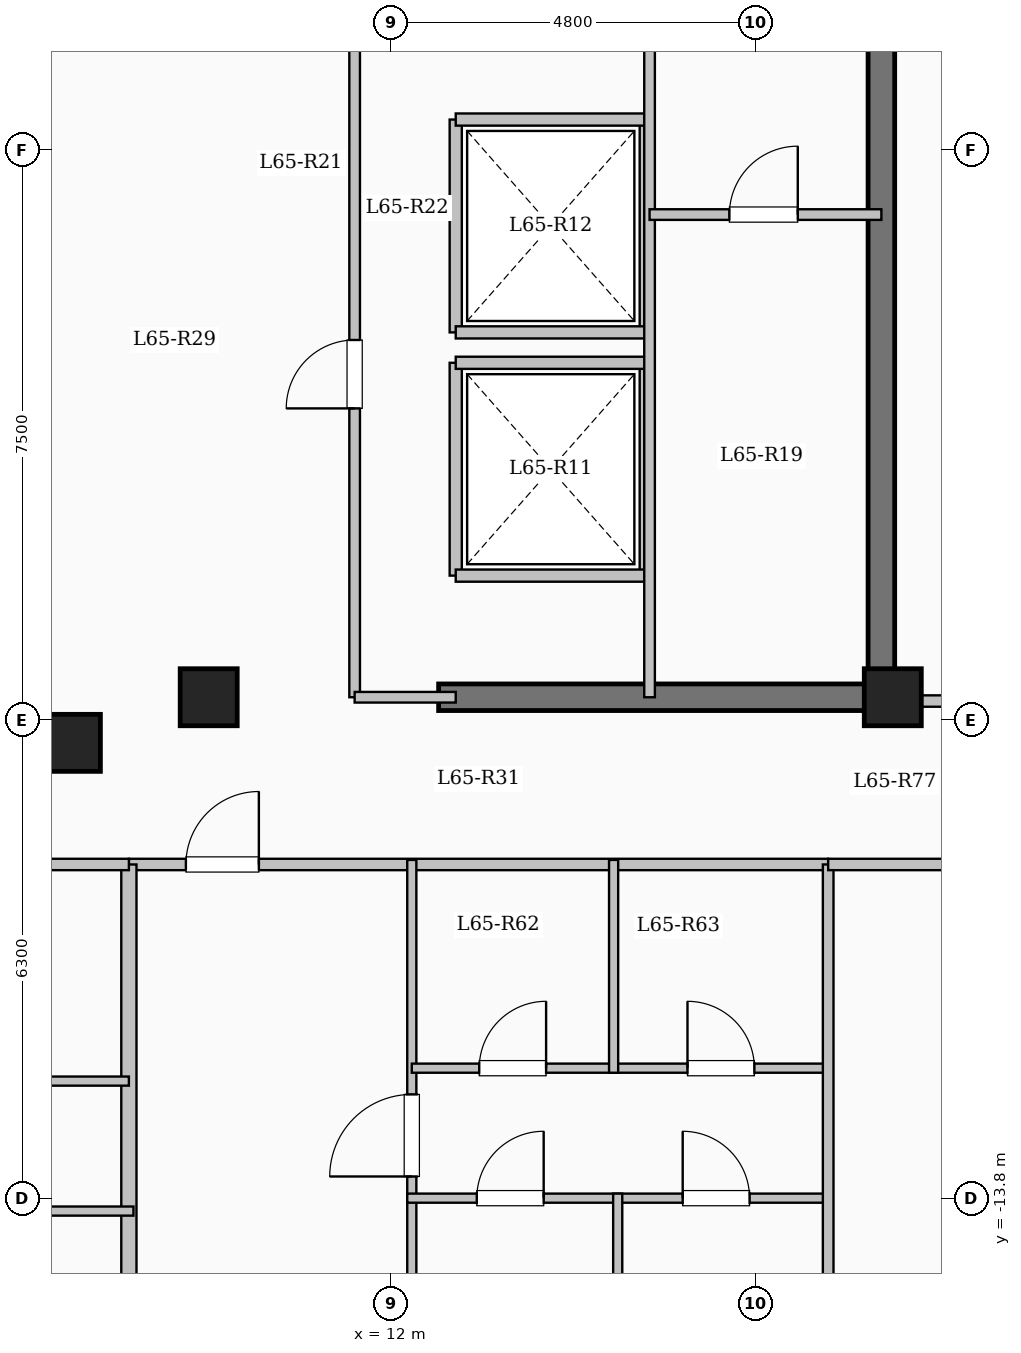
"""IFC4 building model, lengths in metres.
Left out: names, types, materials, properties, quantities, classifications, styles, units other than length and angle.
Written with IfcOpenShell. Run it as: python <this file> out.ifc"""

import sys

from ifc_helpers import new_model, si_unit, direction, frame, frame_2d, origin, origin_2d, place, context, subcontext, project, spatial, rectangle, extrude, element, fill, save


model = new_model("IFC4")
c1 = context("Model", 3, precision=1e-05, world=origin(), true_north=direction((0.0, 1.0)))
c2 = subcontext(c1, "Body", "Model", "MODEL_VIEW")
j1 = project(units=[si_unit("LENGTHUNIT", "METRE"), si_unit("PLANEANGLEUNIT", "RADIAN")], contexts=[c1])
p1 = place(None, origin())
s1 = spatial("IfcSite", under=j1, at=p1, CompositionType="ELEMENT")
p2 = place(p1, origin())
s2 = spatial("IfcBuilding", under=s1, at=p2, CompositionType="ELEMENT")
p3 = place(p2, frame((0.0, 0.0, 241.5)))
s3 = spatial("IfcBuildingStorey", under=s2, at=p3, CompositionType="ELEMENT", Elevation=241.5)
for number, where, z_axis, x_axis in (
    (1, (7.8, -7.8, 0.0), (0.0, 0.0, 1.0), (1.0, 0.0, 0.0)),
    (2, (9.6, -7.2, 0.0), (0.0, 0.0, 1.0), (1.0, 0.0, 0.0)),
    (3, (18.6, -7.2, 0.0), (0.0, 0.0, 1.0), (1.0, 0.0, 0.0)),
):
    element("IfcColumn", number, at=place(p3, frame(where, z_axis=z_axis, x_axis=x_axis)), inside=s3, PredefinedType="COLUMN", context=c2, shape_type="SweptSolid", body=[
        extrude(rectangle(XDim=0.75, YDim=0.75, at=origin_2d()), origin(), (0.0, 0.0, 1.0), 3.35),
    ])
for number, where, z_axis, x_axis in (
    (4, (12.85, -5.6, 0.0), (0.0, 0.0, 1.0), (0.0, 1.0, 0.0)),
    (5, (15.35, -5.6, 0.0), (0.0, 0.0, 1.0), (0.0, 1.0, 0.0)),
):
    element("IfcWall", number, at=place(p3, frame(where, z_axis=z_axis, x_axis=x_axis)), inside=s3, PredefinedType="SOLIDWALL", context=c2, shape_type="SweptSolid", body=[
        extrude(rectangle(XDim=2.8, YDim=0.16, at=frame_2d((1.4, 0.0))), origin(), (0.0, 0.0, 1.0), 3.1),
    ])
for number, where, z_axis, x_axis in (
    (6, (12.85, -5.6, 0.0), (0.0, 0.0, 1.0), (1.0, 0.0, 0.0)),
    (7, (12.85, -2.8, 0.0), (0.0, 0.0, 1.0), (1.0, 0.0, 0.0)),
):
    element("IfcWall", number, at=place(p3, frame(where, z_axis=z_axis, x_axis=x_axis)), inside=s3, PredefinedType="SOLIDWALL", context=c2, shape_type="SweptSolid", body=[
        extrude(rectangle(XDim=2.5, YDim=0.16, at=frame_2d((1.25, 0.0))), origin(), (0.0, 0.0, 1.0), 3.1),
    ])
for number, where, z_axis, x_axis in (
    (8, (12.85, -2.4, 0.0), (0.0, 0.0, 1.0), (0.0, 1.0, 0.0)),
    (9, (15.35, -2.4, 0.0), (0.0, 0.0, 1.0), (0.0, 1.0, 0.0)),
):
    element("IfcWall", number, at=place(p3, frame(where, z_axis=z_axis, x_axis=x_axis)), inside=s3, PredefinedType="SOLIDWALL", context=c2, shape_type="SweptSolid", body=[
        extrude(rectangle(XDim=2.8, YDim=0.16, at=frame_2d((1.4, 0.0))), origin(), (0.0, 0.0, 1.0), 3.1),
    ])
for number, where, z_axis, x_axis in (
    (10, (12.85, -2.4, 0.0), (0.0, 0.0, 1.0), (1.0, 0.0, 0.0)),
    (11, (12.85, 0.4, 0.0), (0.0, 0.0, 1.0), (1.0, 0.0, 0.0)),
):
    element("IfcWall", number, at=place(p3, frame(where, z_axis=z_axis, x_axis=x_axis)), inside=s3, PredefinedType="SOLIDWALL", context=c2, shape_type="SweptSolid", body=[
        extrude(rectangle(XDim=2.5, YDim=0.16, at=frame_2d((1.25, 0.0))), origin(), (0.0, 0.0, 1.0), 3.1),
    ])
p4 = place(p3, frame((18.45, -7.375, 0.0), z_axis=(0.0, 0.0, 1.0), x_axis=(0.0, 1.0, 0.0)))
e12 = element("IfcWall", 12, at=p4, inside=s3, PredefinedType="SHEAR", context=c2, shape_type="SweptSolid", body=[
    extrude(rectangle(XDim=14.05, YDim=0.35, at=frame_2d((7.025, 0.0))), origin(), (0.0, 0.0, 1.0), 3.35),
])
p5 = place(p3, frame((12.625, -7.2, 0.0), z_axis=(0.0, 0.0, 1.0), x_axis=(1.0, 0.0, 0.0)))
e13 = element("IfcWall", 13, at=p5, inside=s3, PredefinedType="SHEAR", context=c2, shape_type="SweptSolid", body=[
    extrude(rectangle(XDim=6.0, YDim=0.35, at=frame_2d((3.0, 0.0))), origin(), (0.0, 0.0, 1.0), 3.35),
])
p6 = place(p3, frame((15.4, -7.2, 0.0), z_axis=(0.0, 0.0, 1.0), x_axis=(0.0, 1.0, 0.0)))
e14 = element("IfcWall", 14, at=p6, inside=s3, PredefinedType="PARTITIONING", context=c2, shape_type="SweptSolid", body=[
    extrude(rectangle(XDim=10.45, YDim=0.14, at=frame_2d((5.225, 0.0))), origin(), (0.0, 0.0, 1.0), 3.1),
])
p7 = place(p6, frame((9.25, 0.0, 0.0)))
e15 = element("IfcOpeningElement", 15, at=p7, cuts=e14, PredefinedType="OPENING", context=c2, shape_type="SweptSolid", body=[
    extrude(rectangle(XDim=0.9, YDim=2.08, at=frame_2d((0.45, 1.04))), frame((0.0, 0.08, 0.0), z_axis=(0.0, -1.0, 0.0), x_axis=(1.0, 0.0, 0.0)), (0.0, 0.0, 1.0), 0.16),
])
p8 = place(p3, frame((15.4, -0.85, 0.0), z_axis=(0.0, 0.0, 1.0), x_axis=(1.0, 0.0, 0.0)))
e16 = element("IfcWall", 16, at=p8, inside=s3, PredefinedType="PARTITIONING", context=c2, shape_type="SweptSolid", body=[
    extrude(rectangle(XDim=3.05, YDim=0.14, at=frame_2d((1.525, 0.0))), origin(), (0.0, 0.0, 1.0), 3.1),
])
p9 = place(p8, frame((1.05, 0.0, 0.0)))
e17 = element("IfcOpeningElement", 17, at=p9, cuts=e16, PredefinedType="OPENING", context=c2, shape_type="SweptSolid", body=[
    extrude(rectangle(XDim=0.9, YDim=2.08, at=frame_2d((0.45, 1.04))), frame((0.0, 0.08, 0.0), z_axis=(0.0, -1.0, 0.0), x_axis=(1.0, 0.0, 0.0)), (0.0, 0.0, 1.0), 0.16),
])
p10 = place(p3, frame((11.52, -7.2, 0.0), z_axis=(0.0, 0.0, 1.0), x_axis=(0.0, 1.0, 0.0)))
e18 = element("IfcWall", 18, at=p10, inside=s3, PredefinedType="PARTITIONING", context=c2, shape_type="SweptSolid", body=[
    extrude(rectangle(XDim=9.12, YDim=0.14, at=frame_2d((4.56, 0.0))), origin(), (0.0, 0.0, 1.0), 3.1),
])
p11 = place(p10, frame((3.8, 0.0, 0.0)))
e19 = element("IfcOpeningElement", 19, at=p11, cuts=e18, PredefinedType="OPENING", context=c2, shape_type="SweptSolid", body=[
    extrude(rectangle(XDim=0.9, YDim=2.08, at=frame_2d((0.45, 1.04))), frame((0.0, 0.08, 0.0), z_axis=(0.0, -1.0, 0.0), x_axis=(1.0, 0.0, 0.0)), (0.0, 0.0, 1.0), 0.16),
])
p12 = place(p3, frame((11.52, -7.2, 0.0), z_axis=(0.0, 0.0, 1.0), x_axis=(1.0, 0.0, 0.0)))
e20 = element("IfcWall", 20, at=p12, inside=s3, PredefinedType="PARTITIONING", context=c2, shape_type="SweptSolid", body=[
    extrude(rectangle(XDim=1.33, YDim=0.14, at=frame_2d((0.665, 0.0))), origin(), (0.0, 0.0, 1.0), 2.235),
])
p13 = place(p3, frame((8.55, -9.4, 0.0), z_axis=(0.0, 0.0, 1.0), x_axis=(1.0, 0.0, 0.0)))
e21 = element("IfcWall", 21, at=p13, inside=s3, PredefinedType="PARTITIONING", context=c2, shape_type="SweptSolid", body=[
    extrude(rectangle(XDim=9.2, YDim=0.15, at=frame_2d((4.6, 0.0))), origin(), (0.0, 0.0, 1.0), 3.1),
])
p14 = place(p13, frame((0.75, 0.0, 0.0)))
e22 = element("IfcOpeningElement", 22, at=p14, cuts=e21, PredefinedType="OPENING", context=c2, shape_type="SweptSolid", body=[
    extrude(rectangle(XDim=0.96, YDim=2.15, at=frame_2d((0.48, 1.075))), frame((0.0, 0.085, 0.0), z_axis=(0.0, -1.0, 0.0), x_axis=(1.0, 0.0, 0.0)), (0.0, 0.0, 1.0), 0.17),
])
p15 = place(p3, frame((12.272, -20.9, 0.0), z_axis=(0.0, 0.0, 1.0), x_axis=(0.0, 1.0, 0.0)))
e23 = element("IfcWall", 23, at=p15, inside=s3, PredefinedType="PARTITIONING", context=c2, shape_type="SweptSolid", body=[
    extrude(rectangle(XDim=11.56, YDim=0.12, at=frame_2d((5.78, 0.0))), origin(), (0.0, 0.0, 1.0), 3.1),
])
p16 = place(p15, frame((7.395, 0.0, 0.0)))
e24 = element("IfcOpeningElement", 24, at=p16, cuts=e23, PredefinedType="OPENING", context=c2, shape_type="SweptSolid", body=[
    extrude(rectangle(XDim=1.08, YDim=2.15, at=frame_2d((0.54, 1.075))), frame((0.0, 0.07, 0.0), z_axis=(0.0, -1.0, 0.0), x_axis=(1.0, 0.0, 0.0)), (0.0, 0.0, 1.0), 0.14),
])
p17 = place(p3, frame((12.272, -12.08, 0.0), z_axis=(0.0, 0.0, 1.0), x_axis=(1.0, 0.0, 0.0)))
e25 = element("IfcWall", 25, at=p17, inside=s3, PredefinedType="PARTITIONING", context=c2, shape_type="SweptSolid", body=[
    extrude(rectangle(XDim=2.655, YDim=0.12, at=frame_2d((1.328, 0.0))), origin(), (0.0, 0.0, 1.0), 2.785),
])
p18 = place(p17, frame((0.887, 0.0, 0.0)))
e26 = element("IfcOpeningElement", 26, at=p18, cuts=e25, PredefinedType="OPENING", context=c2, shape_type="SweptSolid", body=[
    extrude(rectangle(XDim=0.88, YDim=2.1, at=frame_2d((0.44, 1.05))), frame((0.0, 0.07, 0.0), z_axis=(0.0, -1.0, 0.0), x_axis=(1.0, 0.0, 0.0)), (0.0, 0.0, 1.0), 0.14),
])
p19 = place(p3, frame((14.927, -12.08, 0.0), z_axis=(0.0, 0.0, 1.0), x_axis=(1.0, 0.0, 0.0)))
e27 = element("IfcWall", 27, at=p19, inside=s3, PredefinedType="PARTITIONING", context=c2, shape_type="SweptSolid", body=[
    extrude(rectangle(XDim=2.823, YDim=0.12, at=frame_2d((1.412, 0.0))), origin(), (0.0, 0.0, 1.0), 3.1),
])
p20 = place(p19, frame((0.972, 0.0, 0.0)))
e28 = element("IfcOpeningElement", 28, at=p20, cuts=e27, PredefinedType="OPENING", context=c2, shape_type="SweptSolid", body=[
    extrude(rectangle(XDim=0.88, YDim=2.1, at=frame_2d((0.44, 1.05))), frame((0.0, 0.07, 0.0), z_axis=(0.0, -1.0, 0.0), x_axis=(1.0, 0.0, 0.0)), (0.0, 0.0, 1.0), 0.14),
])
p21 = place(p3, frame((12.212, -13.79, 0.0), z_axis=(0.0, 0.0, 1.0), x_axis=(1.0, 0.0, 0.0)))
e29 = element("IfcWall", 29, at=p21, inside=s3, PredefinedType="PARTITIONING", context=c2, shape_type="SweptSolid", body=[
    extrude(rectangle(XDim=5.598, YDim=0.12, at=frame_2d((2.799, 0.0))), origin(), (0.0, 0.0, 1.0), 2.785),
])
p22 = place(p21, frame((0.915, 0.0, 0.0)))
e30 = element("IfcOpeningElement", 30, at=p22, cuts=e29, PredefinedType="OPENING", context=c2, shape_type="SweptSolid", body=[
    extrude(rectangle(XDim=0.88, YDim=2.1, at=frame_2d((0.44, 1.05))), frame((0.0, 0.07, 0.0), z_axis=(0.0, -1.0, 0.0), x_axis=(1.0, 0.0, 0.0)), (0.0, 0.0, 1.0), 0.14),
])
p23 = place(p21, frame((3.624, 0.0, 0.0)))
e31 = element("IfcOpeningElement", 31, at=p23, cuts=e29, PredefinedType="OPENING", context=c2, shape_type="SweptSolid", body=[
    extrude(rectangle(XDim=0.88, YDim=2.1, at=frame_2d((0.44, 1.05))), frame((0.0, 0.07, 0.0), z_axis=(0.0, -1.0, 0.0), x_axis=(1.0, 0.0, 0.0)), (0.0, 0.0, 1.0), 0.14),
])
p24 = place(p3, frame((14.927, -12.14, 0.0), z_axis=(0.0, 0.0, 1.0), x_axis=(0.0, 1.0, 0.0)))
e32 = element("IfcWall", 32, at=p24, inside=s3, PredefinedType="PARTITIONING", context=c2, shape_type="SweptSolid", body=[
    extrude(rectangle(XDim=2.8, YDim=0.12, at=frame_2d((1.4, 0.0))), origin(), (0.0, 0.0, 1.0), 2.685),
])
p25 = place(p3, frame((14.981, -20.9, 0.0), z_axis=(0.0, 0.0, 1.0), x_axis=(0.0, 1.0, 0.0)))
e33 = element("IfcWall", 33, at=p25, inside=s3, PredefinedType="PARTITIONING", context=c2, shape_type="SweptSolid", body=[
    extrude(rectangle(XDim=7.17, YDim=0.12, at=frame_2d((3.585, 0.0))), origin(), (0.0, 0.0, 1.0), 2.685),
])
p26 = place(p3, frame((8.55, -21.504, 0.0), z_axis=(0.0, 0.0, 1.0), x_axis=(0.0, 1.0, 0.0)))
e34 = element("IfcWall", 34, at=p26, inside=s3, PredefinedType="SOLIDWALL", context=c2, shape_type="SweptSolid", body=[
    extrude(rectangle(XDim=12.104, YDim=0.2, at=frame_2d((6.052, 0.0))), origin(), (0.0, 0.0, 1.0), 3.1),
])
p27 = place(p3, frame((-8.55, -9.4, 0.0), z_axis=(0.0, 0.0, 1.0), x_axis=(1.0, 0.0, 0.0)))
e35 = element("IfcWall", 35, at=p27, inside=s3, PredefinedType="PARTITIONING", context=c2, shape_type="SweptSolid", body=[
    extrude(rectangle(XDim=17.1, YDim=0.15, at=frame_2d((8.55, 0.0))), origin(), (0.0, 0.0, 1.0), 3.1),
])
p28 = place(p27, frame((1.75, 0.0, 0.0)))
e36 = element("IfcOpeningElement", 36, at=p28, cuts=e35, PredefinedType="OPENING", context=c2, shape_type="SweptSolid", body=[
    extrude(rectangle(XDim=0.96, YDim=2.15, at=frame_2d((0.48, 1.075))), frame((0.0, 0.085, 0.0), z_axis=(0.0, -1.0, 0.0), x_axis=(1.0, 0.0, 0.0)), (0.0, 0.0, 1.0), 0.17),
])
p29 = place(p3, frame((3.697, -12.25, 0.0), z_axis=(0.0, 0.0, 1.0), x_axis=(1.0, 0.0, 0.0)))
e37 = element("IfcWall", 37, at=p29, inside=s3, PredefinedType="PARTITIONING", context=c2, shape_type="SweptSolid", body=[
    extrude(rectangle(XDim=4.853, YDim=0.12, at=frame_2d((2.427, 0.0))), origin(), (0.0, 0.0, 1.0), 2.785),
])
p30 = place(p29, frame((1.987, 0.0, 0.0)))
e38 = element("IfcOpeningElement", 38, at=p30, cuts=e37, PredefinedType="OPENING", context=c2, shape_type="SweptSolid", body=[
    extrude(rectangle(XDim=0.88, YDim=2.1, at=frame_2d((0.44, 1.05))), frame((0.0, 0.07, 0.0), z_axis=(0.0, -1.0, 0.0), x_axis=(1.0, 0.0, 0.0)), (0.0, 0.0, 1.0), 0.14),
])
p31 = place(p3, frame((-1.756, -13.96, 0.0), z_axis=(0.0, 0.0, 1.0), x_axis=(1.0, 0.0, 0.0)))
e39 = element("IfcWall", 39, at=p31, inside=s3, PredefinedType="PARTITIONING", context=c2, shape_type="SweptSolid", body=[
    extrude(rectangle(XDim=10.366, YDim=0.12, at=frame_2d((5.183, 0.0))), origin(), (0.0, 0.0, 1.0), 2.785),
])
p32 = place(p31, frame((1.256, 0.0, 0.0)))
e40 = element("IfcOpeningElement", 40, at=p32, cuts=e39, PredefinedType="OPENING", context=c2, shape_type="SweptSolid", body=[
    extrude(rectangle(XDim=0.88, YDim=2.1, at=frame_2d((0.44, 1.05))), frame((0.0, 0.07, 0.0), z_axis=(0.0, -1.0, 0.0), x_axis=(1.0, 0.0, 0.0)), (0.0, 0.0, 1.0), 0.14),
])
p33 = place(p31, frame((4.648, 0.0, 0.0)))
e41 = element("IfcOpeningElement", 41, at=p33, cuts=e39, PredefinedType="OPENING", context=c2, shape_type="SweptSolid", body=[
    extrude(rectangle(XDim=0.88, YDim=2.1, at=frame_2d((0.44, 1.05))), frame((0.0, 0.07, 0.0), z_axis=(0.0, -1.0, 0.0), x_axis=(1.0, 0.0, 0.0)), (0.0, 0.0, 1.0), 0.14),
])
p34 = place(p31, frame((8.04, 0.0, 0.0)))
e42 = element("IfcOpeningElement", 42, at=p34, cuts=e39, PredefinedType="OPENING", context=c2, shape_type="SweptSolid", body=[
    extrude(rectangle(XDim=0.88, YDim=2.1, at=frame_2d((0.44, 1.05))), frame((0.0, 0.07, 0.0), z_axis=(0.0, -1.0, 0.0), x_axis=(1.0, 0.0, 0.0)), (0.0, 0.0, 1.0), 0.14),
])
p35 = place(p3, frame((18.45, -7.25, 0.0), z_axis=(0.0, 0.0, 1.0), x_axis=(1.0, 0.0, 0.0)))
e43 = element("IfcWall", 43, at=p35, inside=s3, PredefinedType="PARTITIONING", context=c2, shape_type="SweptSolid", body=[
    extrude(rectangle(XDim=4.23, YDim=0.15, at=frame_2d((2.115, 0.0))), origin(), (0.0, 0.0, 1.0), 3.1),
])
p36 = place(p35, frame((1.65, 0.0, 0.0)))
e44 = element("IfcOpeningElement", 44, at=p36, cuts=e43, PredefinedType="OPENING", context=c2, shape_type="SweptSolid", body=[
    extrude(rectangle(XDim=0.96, YDim=2.15, at=frame_2d((0.48, 1.075))), frame((0.0, 0.085, 0.0), z_axis=(0.0, -1.0, 0.0), x_axis=(1.0, 0.0, 0.0)), (0.0, 0.0, 1.0), 0.17),
])
p37 = place(p3, frame((17.75, -17.55, 0.0), z_axis=(0.0, 0.0, 1.0), x_axis=(0.0, 1.0, 0.0)))
e45 = element("IfcWall", 45, at=p37, inside=s3, PredefinedType="PARTITIONING", context=c2, shape_type="SweptSolid", body=[
    extrude(rectangle(XDim=8.15, YDim=0.14, at=frame_2d((4.075, 0.0))), origin(), (0.0, 0.0, 1.0), 3.1),
])
p38 = place(p3, frame((17.75, -9.4, 0.0), z_axis=(0.0, 0.0, 1.0), x_axis=(1.0, 0.0, 0.0)))
e46 = element("IfcWall", 46, at=p38, inside=s3, PredefinedType="PARTITIONING", context=c2, shape_type="SweptSolid", body=[
    extrude(rectangle(XDim=4.93, YDim=0.15, at=frame_2d((2.465, 0.0))), origin(), (0.0, 0.0, 1.0), 3.1),
])
p39 = place(p38, frame((1.99, 0.0, 0.0)))
e47 = element("IfcOpeningElement", 47, at=p39, cuts=e46, PredefinedType="OPENING", context=c2, shape_type="SweptSolid", body=[
    extrude(rectangle(XDim=0.95, YDim=2.15, at=frame_2d((0.475, 1.075))), frame((0.0, 0.085, 0.0), z_axis=(0.0, -1.0, 0.0), x_axis=(1.0, 0.0, 0.0)), (0.0, 0.0, 1.0), 0.17),
])
p40 = place(p9, origin())
e48 = element("IfcDoor", 48, at=p40, inside=s3, OperationType="SINGLE_SWING_RIGHT", PredefinedType="DOOR", context=c2, shape_type="SweptSolid", body=[
    extrude(rectangle(XDim=0.9, YDim=2.08, at=frame_2d((0.45, 1.04))), frame((0.0, 0.025, 0.0), z_axis=(0.0, -1.0, 0.0), x_axis=(1.0, 0.0, 0.0)), (0.0, 0.0, 1.0), 0.05),
])
fill(e17, e48)
p41 = place(p11, origin())
e49 = element("IfcDoor", 49, at=p41, inside=s3, OperationType="SINGLE_SWING_LEFT", PredefinedType="DOOR", context=c2, shape_type="SweptSolid", body=[
    extrude(rectangle(XDim=0.9, YDim=2.08, at=frame_2d((0.45, 1.04))), frame((0.0, 0.025, 0.0), z_axis=(0.0, -1.0, 0.0), x_axis=(1.0, 0.0, 0.0)), (0.0, 0.0, 1.0), 0.05),
])
fill(e19, e49)
p42 = place(p14, origin())
e50 = element("IfcDoor", 50, at=p42, inside=s3, OperationType="SINGLE_SWING_RIGHT", PredefinedType="DOOR", context=c2, shape_type="SweptSolid", body=[
    extrude(rectangle(XDim=0.96, YDim=2.15, at=frame_2d((0.48, 1.075))), frame((0.0, 0.025, 0.0), z_axis=(0.0, -1.0, 0.0), x_axis=(1.0, 0.0, 0.0)), (0.0, 0.0, 1.0), 0.05),
])
fill(e22, e50)
p43 = place(p16, origin())
e51 = element("IfcDoor", 51, at=p43, inside=s3, OperationType="SINGLE_SWING_LEFT", PredefinedType="DOOR", context=c2, shape_type="SweptSolid", body=[
    extrude(rectangle(XDim=1.08, YDim=2.15, at=frame_2d((0.54, 1.075))), frame((0.0, 0.025, 0.0), z_axis=(0.0, -1.0, 0.0), x_axis=(1.0, 0.0, 0.0)), (0.0, 0.0, 1.0), 0.05),
])
fill(e24, e51)
p44 = place(p18, origin())
e52 = element("IfcDoor", 52, at=p44, inside=s3, OperationType="SINGLE_SWING_RIGHT", PredefinedType="DOOR", context=c2, shape_type="SweptSolid", body=[
    extrude(rectangle(XDim=0.88, YDim=2.1, at=frame_2d((0.44, 1.05))), frame((0.0, 0.025, 0.0), z_axis=(0.0, -1.0, 0.0), x_axis=(1.0, 0.0, 0.0)), (0.0, 0.0, 1.0), 0.05),
])
fill(e26, e52)
p45 = place(p20, origin())
e53 = element("IfcDoor", 53, at=p45, inside=s3, OperationType="SINGLE_SWING_LEFT", PredefinedType="DOOR", context=c2, shape_type="SweptSolid", body=[
    extrude(rectangle(XDim=0.88, YDim=2.1, at=frame_2d((0.44, 1.05))), frame((0.0, 0.025, 0.0), z_axis=(0.0, -1.0, 0.0), x_axis=(1.0, 0.0, 0.0)), (0.0, 0.0, 1.0), 0.05),
])
fill(e28, e53)
p46 = place(p22, origin())
e54 = element("IfcDoor", 54, at=p46, inside=s3, OperationType="SINGLE_SWING_RIGHT", PredefinedType="DOOR", context=c2, shape_type="SweptSolid", body=[
    extrude(rectangle(XDim=0.88, YDim=2.1, at=frame_2d((0.44, 1.05))), frame((0.0, 0.025, 0.0), z_axis=(0.0, -1.0, 0.0), x_axis=(1.0, 0.0, 0.0)), (0.0, 0.0, 1.0), 0.05),
])
fill(e30, e54)
p47 = place(p23, origin())
e55 = element("IfcDoor", 55, at=p47, inside=s3, OperationType="SINGLE_SWING_LEFT", PredefinedType="DOOR", context=c2, shape_type="SweptSolid", body=[
    extrude(rectangle(XDim=0.88, YDim=2.1, at=frame_2d((0.44, 1.05))), frame((0.0, 0.025, 0.0), z_axis=(0.0, -1.0, 0.0), x_axis=(1.0, 0.0, 0.0)), (0.0, 0.0, 1.0), 0.05),
])
fill(e31, e55)
save(model, sys.argv[1])
